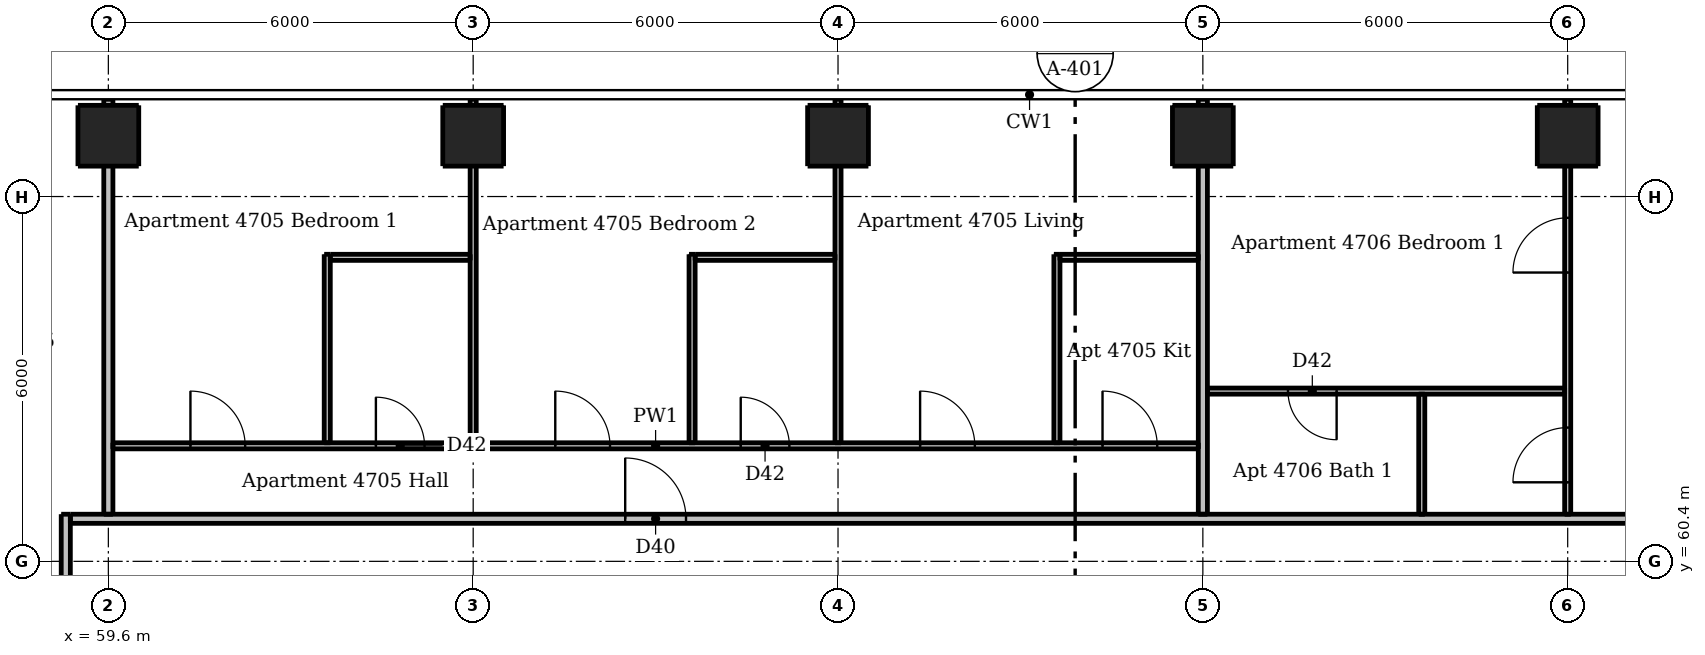
"""IFC4 building model, lengths in metres.
Left out: names, types, materials, properties, quantities, classifications, styles, units other than length and angle.
Written with IfcOpenShell. Run it as: python <this file> out.ifc"""

import sys

from ifc_helpers import new_model, si_unit, direction, frame, frame_2d, origin, origin_2d, place, context, subcontext, project, spatial, rectangle, extrude, element, fill, save


model = new_model("IFC4")
c1 = context("Model", 3, precision=1e-05, world=origin(), true_north=direction((0.0, 1.0)))
c2 = subcontext(c1, "Body", "Model", "MODEL_VIEW")
j1 = project(units=[si_unit("LENGTHUNIT", "METRE"), si_unit("PLANEANGLEUNIT", "RADIAN")], contexts=[c1])
p1 = place(None, origin())
s1 = spatial("IfcSite", under=j1, at=p1, CompositionType="ELEMENT")
p2 = place(p1, origin())
s2 = spatial("IfcBuilding", under=s1, at=p2, CompositionType="ELEMENT")
p3 = place(p2, frame((0.0, 0.0, 174.7)))
s3 = spatial("IfcBuildingStorey", under=s2, at=p3, CompositionType="ELEMENT", Elevation=174.7)
for number, where, z_axis, x_axis in (
    (1, (59.6, 67.4, 0.0), (0.0, 0.0, 1.0), (1.0, 0.0, 0.0)),
    (2, (65.6, 67.4, 0.0), (0.0, 0.0, 1.0), (1.0, 0.0, 0.0)),
    (3, (71.6, 67.4, 0.0), (0.0, 0.0, 1.0), (1.0, 0.0, 0.0)),
    (4, (77.6, 67.4, 0.0), (0.0, 0.0, 1.0), (1.0, 0.0, 0.0)),
    (5, (83.6, 67.4, 0.0), (0.0, 0.0, 1.0), (1.0, 0.0, 0.0)),
):
    element("IfcColumn", number, at=place(p3, frame(where, z_axis=z_axis, x_axis=x_axis)), inside=s3, PredefinedType="COLUMN", context=c2, shape_type="SweptSolid", body=[
        extrude(rectangle(XDim=1.0, YDim=1.0, at=origin_2d()), origin(), (0.0, 0.0, 1.0), 2.95),
    ])
p4 = place(p3, frame((63.2, 62.35, 0.0), z_axis=(0.0, 0.0, 1.0), x_axis=(0.0, 1.0, 0.0)))
e6 = element("IfcWall", 6, at=p4, inside=s3, PredefinedType="PARTITIONING", context=c2, shape_type="SweptSolid", body=[
    extrude(rectangle(XDim=3.1, YDim=0.1, at=frame_2d((1.55, 0.0))), origin(), (0.0, 0.0, 1.0), 2.95),
])
p5 = place(p3, frame((65.6, 62.35, 0.0), z_axis=(0.0, 0.0, 1.0), x_axis=(0.0, 1.0, 0.0)))
e7 = element("IfcWall", 7, at=p5, inside=s3, PredefinedType="PARTITIONING", context=c2, shape_type="SweptSolid", body=[
    extrude(rectangle(XDim=5.65, YDim=0.1, at=frame_2d((2.825, 0.0))), origin(), (0.0, 0.0, 1.0), 2.332),
])
p6 = place(p3, frame((69.2, 62.35, 0.0), z_axis=(0.0, 0.0, 1.0), x_axis=(0.0, 1.0, 0.0)))
e8 = element("IfcWall", 8, at=p6, inside=s3, PredefinedType="PARTITIONING", context=c2, shape_type="SweptSolid", body=[
    extrude(rectangle(XDim=3.1, YDim=0.1, at=frame_2d((1.55, 0.0))), origin(), (0.0, 0.0, 1.0), 2.95),
])
p7 = place(p3, frame((71.6, 62.35, 0.0), z_axis=(0.0, 0.0, 1.0), x_axis=(0.0, 1.0, 0.0)))
e9 = element("IfcWall", 9, at=p7, inside=s3, PredefinedType="PARTITIONING", context=c2, shape_type="SweptSolid", body=[
    extrude(rectangle(XDim=5.65, YDim=0.1, at=frame_2d((2.825, 0.0))), origin(), (0.0, 0.0, 1.0), 2.332),
])
p8 = place(p3, frame((75.2, 62.35, 0.0), z_axis=(0.0, 0.0, 1.0), x_axis=(0.0, 1.0, 0.0)))
e10 = element("IfcWall", 10, at=p8, inside=s3, PredefinedType="PARTITIONING", context=c2, shape_type="SweptSolid", body=[
    extrude(rectangle(XDim=3.1, YDim=0.1, at=frame_2d((1.55, 0.0))), origin(), (0.0, 0.0, 1.0), 2.95),
])
p9 = place(p3, frame((81.2, 61.175, 0.0), z_axis=(0.0, 0.0, 1.0), x_axis=(0.0, 1.0, 0.0)))
e11 = element("IfcWall", 11, at=p9, inside=s3, PredefinedType="PARTITIONING", context=c2, shape_type="SweptSolid", body=[
    extrude(rectangle(XDim=1.975, YDim=0.1, at=frame_2d((0.987, 0.0))), origin(), (0.0, 0.0, 1.0), 2.95),
])
p10 = place(p3, frame((83.6, 61.175, 0.0), z_axis=(0.0, 0.0, 1.0), x_axis=(0.0, 1.0, 0.0)))
e12 = element("IfcWall", 12, at=p10, inside=s3, PredefinedType="PARTITIONING", context=c2, shape_type="SweptSolid", body=[
    extrude(rectangle(XDim=6.825, YDim=0.1, at=frame_2d((3.413, 0.0))), origin(), (0.0, 0.0, 1.0), 2.332),
])
p11 = place(p10, frame((0.525, 0.0, 0.0)))
e13 = element("IfcOpeningElement", 13, at=p11, cuts=e12, PredefinedType="OPENING", context=c2, shape_type="SweptSolid", body=[
    extrude(rectangle(XDim=0.9, YDim=2.1, at=frame_2d((0.45, 1.05))), frame((0.0, 0.06, 0.0), z_axis=(0.0, -1.0, 0.0), x_axis=(1.0, 0.0, 0.0)), (0.0, 0.0, 1.0), 0.12),
])
p12 = place(p10, frame((3.975, 0.0, 0.0)))
e14 = element("IfcOpeningElement", 14, at=p12, cuts=e12, PredefinedType="OPENING", context=c2, shape_type="SweptSolid", body=[
    extrude(rectangle(XDim=0.9, YDim=2.1, at=frame_2d((0.45, 1.05))), frame((0.0, 0.06, 0.0), z_axis=(0.0, -1.0, 0.0), x_axis=(1.0, 0.0, 0.0)), (0.0, 0.0, 1.0), 0.12),
])
for number, where, z_axis, x_axis in (
    (15, (63.25, 65.4, 0.0), (0.0, 0.0, 1.0), (1.0, 0.0, 0.0)),
    (16, (69.25, 65.4, 0.0), (0.0, 0.0, 1.0), (1.0, 0.0, 0.0)),
):
    element("IfcWall", number, at=place(p3, frame(where, z_axis=z_axis, x_axis=x_axis)), inside=s3, PredefinedType="PARTITIONING", context=c2, shape_type="SweptSolid", body=[
        extrude(rectangle(XDim=2.3, YDim=0.1, at=frame_2d((1.15, 0.0))), origin(), (0.0, 0.0, 1.0), 2.95),
    ])
p13 = place(p3, frame((75.25, 65.4, 0.0), z_axis=(0.0, 0.0, 1.0), x_axis=(1.0, 0.0, 0.0)))
e17 = element("IfcWall", 17, at=p13, inside=s3, PredefinedType="PARTITIONING", context=c2, shape_type="SweptSolid", body=[
    extrude(rectangle(XDim=2.275, YDim=0.1, at=frame_2d((1.137, 0.0))), origin(), (0.0, 0.0, 1.0), 2.95),
])
p14 = place(p3, frame((83.55, 63.2, 0.0), z_axis=(0.0, 0.0, 1.0), x_axis=(-1.0, 0.0, 0.0)))
e18 = element("IfcWall", 18, at=p14, inside=s3, PredefinedType="PARTITIONING", context=c2, shape_type="SweptSolid", body=[
    extrude(rectangle(XDim=5.875, YDim=0.1, at=frame_2d((2.938, 0.0))), origin(), (0.0, 0.0, 1.0), 2.95),
])
p15 = place(p14, frame((3.75, 0.0, 0.0)))
e19 = element("IfcOpeningElement", 19, at=p15, cuts=e18, PredefinedType="OPENING", context=c2, shape_type="SweptSolid", body=[
    extrude(rectangle(XDim=0.8, YDim=2.1, at=frame_2d((0.4, 1.05))), frame((0.0, 0.06, 0.0), z_axis=(0.0, -1.0, 0.0), x_axis=(1.0, 0.0, 0.0)), (0.0, 0.0, 1.0), 0.12),
])
p16 = place(p3, frame((59.675, 62.3, 0.0), z_axis=(0.0, 0.0, 1.0), x_axis=(1.0, 0.0, 0.0)))
e20 = element("IfcWall", 20, at=p16, inside=s3, PredefinedType="PARTITIONING", context=c2, shape_type="SweptSolid", body=[
    extrude(rectangle(XDim=17.85, YDim=0.1, at=frame_2d((8.925, 0.0))), origin(), (0.0, 0.0, 1.0), 2.95),
])
p17 = place(p16, frame((13.275, 0.0, 0.0)))
e21 = element("IfcOpeningElement", 21, at=p17, cuts=e20, PredefinedType="OPENING", context=c2, shape_type="SweptSolid", body=[
    extrude(rectangle(XDim=0.9, YDim=2.1, at=frame_2d((0.45, 1.05))), frame((0.0, 0.06, 0.0), z_axis=(0.0, -1.0, 0.0), x_axis=(1.0, 0.0, 0.0)), (0.0, 0.0, 1.0), 0.12),
])
p18 = place(p16, frame((16.275, 0.0, 0.0)))
e22 = element("IfcOpeningElement", 22, at=p18, cuts=e20, PredefinedType="OPENING", context=c2, shape_type="SweptSolid", body=[
    extrude(rectangle(XDim=0.9, YDim=2.1, at=frame_2d((0.45, 1.05))), frame((0.0, 0.06, 0.0), z_axis=(0.0, -1.0, 0.0), x_axis=(1.0, 0.0, 0.0)), (0.0, 0.0, 1.0), 0.12),
])
p19 = place(p16, frame((1.275, 0.0, 0.0)))
e23 = element("IfcOpeningElement", 23, at=p19, cuts=e20, PredefinedType="OPENING", context=c2, shape_type="SweptSolid", body=[
    extrude(rectangle(XDim=0.9, YDim=2.1, at=frame_2d((0.45, 1.05))), frame((0.0, 0.06, 0.0), z_axis=(0.0, -1.0, 0.0), x_axis=(1.0, 0.0, 0.0)), (0.0, 0.0, 1.0), 0.12),
])
p20 = place(p16, frame((7.275, 0.0, 0.0)))
e24 = element("IfcOpeningElement", 24, at=p20, cuts=e20, PredefinedType="OPENING", context=c2, shape_type="SweptSolid", body=[
    extrude(rectangle(XDim=0.9, YDim=2.1, at=frame_2d((0.45, 1.05))), frame((0.0, 0.06, 0.0), z_axis=(0.0, -1.0, 0.0), x_axis=(1.0, 0.0, 0.0)), (0.0, 0.0, 1.0), 0.12),
])
p21 = place(p16, frame((4.325, 0.0, 0.0)))
e25 = element("IfcOpeningElement", 25, at=p21, cuts=e20, PredefinedType="OPENING", context=c2, shape_type="SweptSolid", body=[
    extrude(rectangle(XDim=0.8, YDim=2.1, at=frame_2d((0.4, 1.05))), frame((0.0, 0.06, 0.0), z_axis=(0.0, -1.0, 0.0), x_axis=(1.0, 0.0, 0.0)), (0.0, 0.0, 1.0), 0.12),
])
p22 = place(p16, frame((10.325, 0.0, 0.0)))
e26 = element("IfcOpeningElement", 26, at=p22, cuts=e20, PredefinedType="OPENING", context=c2, shape_type="SweptSolid", body=[
    extrude(rectangle(XDim=0.8, YDim=2.1, at=frame_2d((0.4, 1.05))), frame((0.0, 0.06, 0.0), z_axis=(0.0, -1.0, 0.0), x_axis=(1.0, 0.0, 0.0)), (0.0, 0.0, 1.0), 0.12),
])
p23 = place(p3, frame((58.9, 30.325, 0.0), z_axis=(0.0, 0.0, 1.0), x_axis=(0.0, 1.0, 0.0)))
e27 = element("IfcWall", 27, at=p23, inside=s3, PredefinedType="PARTITIONING", context=c2, shape_type="SweptSolid", body=[
    extrude(rectangle(XDim=30.85, YDim=0.15, at=frame_2d((15.425, 0.0))), origin(), (0.0, 0.0, 1.0), 2.95),
])
p24 = place(p23, frame((9.225, 0.0, 0.0)))
e28 = element("IfcOpeningElement", 28, at=p24, cuts=e27, PredefinedType="OPENING", context=c2, shape_type="SweptSolid", body=[
    extrude(rectangle(XDim=1.0, YDim=2.1, at=frame_2d((0.5, 1.05))), frame((0.0, 0.085, 0.0), z_axis=(0.0, -1.0, 0.0), x_axis=(1.0, 0.0, 0.0)), (0.0, 0.0, 1.0), 0.17),
])
p25 = place(p23, frame((26.925, 0.0, 0.0)))
e29 = element("IfcOpeningElement", 29, at=p25, cuts=e27, PredefinedType="OPENING", context=c2, shape_type="SweptSolid", body=[
    extrude(rectangle(XDim=1.0, YDim=2.1, at=frame_2d((0.5, 1.05))), frame((0.0, 0.085, 0.0), z_axis=(0.0, -1.0, 0.0), x_axis=(1.0, 0.0, 0.0)), (0.0, 0.0, 1.0), 0.17),
])
for number, where, z_axis, x_axis in (
    (30, (59.6, 61.175, 0.0), (0.0, 0.0, 1.0), (0.0, 1.0, 0.0)),
    (31, (77.6, 61.175, 0.0), (0.0, 0.0, 1.0), (0.0, 1.0, 0.0)),
):
    element("IfcWall", number, at=place(p3, frame(where, z_axis=z_axis, x_axis=x_axis)), inside=s3, PredefinedType="PARTITIONING", context=c2, shape_type="SweptSolid", body=[
        extrude(rectangle(XDim=6.825, YDim=0.15, at=frame_2d((3.413, 0.0))), origin(), (0.0, 0.0, 1.0), 2.332),
    ])
p26 = place(p3, frame((58.975, 61.1, 0.0), z_axis=(0.0, 0.0, 1.0), x_axis=(1.0, 0.0, 0.0)))
e32 = element("IfcWall", 32, at=p26, inside=s3, PredefinedType="PARTITIONING", context=c2, shape_type="SweptSolid", body=[
    extrude(rectangle(XDim=29.25, YDim=0.15, at=frame_2d((14.625, 0.0))), origin(), (0.0, 0.0, 1.0), 2.95),
])
p27 = place(p26, frame((9.125, 0.0, 0.0)))
e33 = element("IfcOpeningElement", 33, at=p27, cuts=e32, PredefinedType="OPENING", context=c2, shape_type="SweptSolid", body=[
    extrude(rectangle(XDim=1.0, YDim=2.1, at=frame_2d((0.5, 1.05))), frame((0.0, 0.085, 0.0), z_axis=(0.0, -1.0, 0.0), x_axis=(1.0, 0.0, 0.0)), (0.0, 0.0, 1.0), 0.17),
])
p28 = place(p26, frame((26.475, 0.0, 0.0)))
e34 = element("IfcOpeningElement", 34, at=p28, cuts=e32, PredefinedType="OPENING", context=c2, shape_type="SweptSolid", body=[
    extrude(rectangle(XDim=1.0, YDim=2.1, at=frame_2d((0.5, 1.05))), frame((0.0, 0.085, 0.0), z_axis=(0.0, -1.0, 0.0), x_axis=(1.0, 0.0, 0.0)), (0.0, 0.0, 1.0), 0.17),
])
p29 = place(p27, origin())
e35 = element("IfcDoor", 35, at=p29, inside=s3, OperationType="SINGLE_SWING_LEFT", PredefinedType="DOOR", context=c2, shape_type="SweptSolid", body=[
    extrude(rectangle(XDim=1.0, YDim=2.1, at=frame_2d((0.5, 1.05))), frame((0.0, 0.025, 0.0), z_axis=(0.0, -1.0, 0.0), x_axis=(1.0, 0.0, 0.0)), (0.0, 0.0, 1.0), 0.05),
])
fill(e33, e35)
p30 = place(p17, origin())
e36 = element("IfcDoor", 36, at=p30, inside=s3, OperationType="SINGLE_SWING_LEFT", PredefinedType="DOOR", context=c2, shape_type="SweptSolid", body=[
    extrude(rectangle(XDim=0.9, YDim=2.1, at=frame_2d((0.45, 1.05))), frame((0.0, 0.025, 0.0), z_axis=(0.0, -1.0, 0.0), x_axis=(1.0, 0.0, 0.0)), (0.0, 0.0, 1.0), 0.05),
])
fill(e21, e36)
p31 = place(p18, origin())
e37 = element("IfcDoor", 37, at=p31, inside=s3, OperationType="SINGLE_SWING_LEFT", PredefinedType="DOOR", context=c2, shape_type="SweptSolid", body=[
    extrude(rectangle(XDim=0.9, YDim=2.1, at=frame_2d((0.45, 1.05))), frame((0.0, 0.025, 0.0), z_axis=(0.0, -1.0, 0.0), x_axis=(1.0, 0.0, 0.0)), (0.0, 0.0, 1.0), 0.05),
])
fill(e22, e37)
p32 = place(p19, origin())
e38 = element("IfcDoor", 38, at=p32, inside=s3, OperationType="SINGLE_SWING_LEFT", PredefinedType="DOOR", context=c2, shape_type="SweptSolid", body=[
    extrude(rectangle(XDim=0.9, YDim=2.1, at=frame_2d((0.45, 1.05))), frame((0.0, 0.025, 0.0), z_axis=(0.0, -1.0, 0.0), x_axis=(1.0, 0.0, 0.0)), (0.0, 0.0, 1.0), 0.05),
])
fill(e23, e38)
p33 = place(p20, origin())
e39 = element("IfcDoor", 39, at=p33, inside=s3, OperationType="SINGLE_SWING_LEFT", PredefinedType="DOOR", context=c2, shape_type="SweptSolid", body=[
    extrude(rectangle(XDim=0.9, YDim=2.1, at=frame_2d((0.45, 1.05))), frame((0.0, 0.025, 0.0), z_axis=(0.0, -1.0, 0.0), x_axis=(1.0, 0.0, 0.0)), (0.0, 0.0, 1.0), 0.05),
])
fill(e24, e39)
p34 = place(p21, origin())
e40 = element("IfcDoor", 40, at=p34, inside=s3, OperationType="SINGLE_SWING_LEFT", PredefinedType="DOOR", context=c2, shape_type="SweptSolid", body=[
    extrude(rectangle(XDim=0.8, YDim=2.1, at=frame_2d((0.4, 1.05))), frame((0.0, 0.025, 0.0), z_axis=(0.0, -1.0, 0.0), x_axis=(1.0, 0.0, 0.0)), (0.0, 0.0, 1.0), 0.05),
])
fill(e25, e40)
p35 = place(p22, origin())
e41 = element("IfcDoor", 41, at=p35, inside=s3, OperationType="SINGLE_SWING_LEFT", PredefinedType="DOOR", context=c2, shape_type="SweptSolid", body=[
    extrude(rectangle(XDim=0.8, YDim=2.1, at=frame_2d((0.4, 1.05))), frame((0.0, 0.025, 0.0), z_axis=(0.0, -1.0, 0.0), x_axis=(1.0, 0.0, 0.0)), (0.0, 0.0, 1.0), 0.05),
])
fill(e26, e41)
p36 = place(p11, origin())
e42 = element("IfcDoor", 42, at=p36, inside=s3, OperationType="SINGLE_SWING_LEFT", PredefinedType="DOOR", context=c2, shape_type="SweptSolid", body=[
    extrude(rectangle(XDim=0.9, YDim=2.1, at=frame_2d((0.45, 1.05))), frame((0.0, 0.025, 0.0), z_axis=(0.0, -1.0, 0.0), x_axis=(1.0, 0.0, 0.0)), (0.0, 0.0, 1.0), 0.05),
])
fill(e13, e42)
p37 = place(p12, origin())
e43 = element("IfcDoor", 43, at=p37, inside=s3, OperationType="SINGLE_SWING_LEFT", PredefinedType="DOOR", context=c2, shape_type="SweptSolid", body=[
    extrude(rectangle(XDim=0.9, YDim=2.1, at=frame_2d((0.45, 1.05))), frame((0.0, 0.025, 0.0), z_axis=(0.0, -1.0, 0.0), x_axis=(1.0, 0.0, 0.0)), (0.0, 0.0, 1.0), 0.05),
])
fill(e14, e43)
p38 = place(p15, origin())
e44 = element("IfcDoor", 44, at=p38, inside=s3, OperationType="SINGLE_SWING_LEFT", PredefinedType="DOOR", context=c2, shape_type="SweptSolid", body=[
    extrude(rectangle(XDim=0.8, YDim=2.1, at=frame_2d((0.4, 1.05))), frame((0.0, 0.025, 0.0), z_axis=(0.0, -1.0, 0.0), x_axis=(1.0, 0.0, 0.0)), (0.0, 0.0, 1.0), 0.05),
])
fill(e19, e44)
save(model, sys.argv[1])
